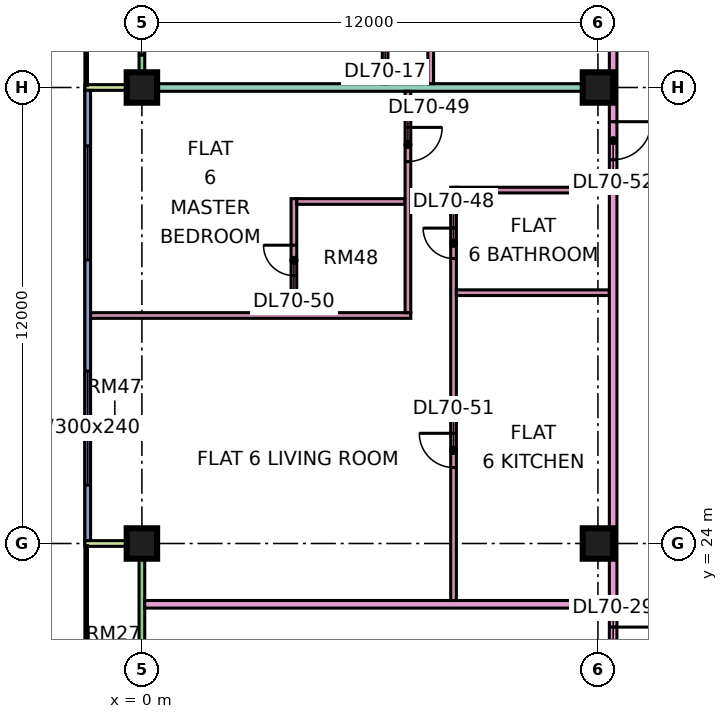
"""IFC4 building model, lengths in metres.
Left out: names, types, materials, properties, quantities, classifications, styles, units other than length and angle.
Written with IfcOpenShell. Run it as: python <this file> out.ifc"""

import sys

from ifc_helpers import new_model, si_unit, direction, frame, frame_2d, origin, origin_2d, place, context, subcontext, project, spatial, rectangle, extrude, element, fill, save


model = new_model("IFC4")
c1 = context("Model", 3, precision=1e-05, world=origin(), true_north=direction((0.0, 1.0)))
c2 = subcontext(c1, "Body", "Model", "MODEL_VIEW")
j1 = project(units=[si_unit("LENGTHUNIT", "METRE"), si_unit("PLANEANGLEUNIT", "RADIAN")], contexts=[c1])
p1 = place(None, origin())
s1 = spatial("IfcSite", under=j1, at=p1, CompositionType="ELEMENT")
p2 = place(p1, origin())
s2 = spatial("IfcBuilding", under=s1, at=p2, CompositionType="ELEMENT")
p3 = place(p2, frame((0.0, 0.0, 299.65)))
s3 = spatial("IfcBuildingStorey", under=s2, at=p3, CompositionType="ELEMENT", Elevation=299.65)
p4 = place(p3, frame((0.0, 24.0, 0.0), z_axis=(0.0, 0.0, 1.0), x_axis=(1.0, 0.0, 0.0)))
e1 = element("IfcColumn", 1, at=p4, inside=s3, PredefinedType="COLUMN", context=c2, shape_type="SweptSolid", body=[
    extrude(rectangle(XDim=0.8, YDim=0.8, at=origin_2d()), origin(), (0.0, 0.0, 1.0), 3.75),
])
p5 = place(p3, frame((0.0, 36.0, 0.0), z_axis=(0.0, 0.0, 1.0), x_axis=(1.0, 0.0, 0.0)))
e2 = element("IfcColumn", 2, at=p5, inside=s3, PredefinedType="COLUMN", context=c2, shape_type="SweptSolid", body=[
    extrude(rectangle(XDim=0.8, YDim=0.8, at=origin_2d()), origin(), (0.0, 0.0, 1.0), 3.75),
])
for number, where, z_axis, x_axis in (
    (3, (12.0, 24.0, 0.0), (0.0, 0.0, 1.0), (1.0, 0.0, 0.0)),
    (4, (12.0, 36.0, 0.0), (0.0, 0.0, 1.0), (1.0, 0.0, 0.0)),
):
    element("IfcColumn", number, at=place(p3, frame(where, z_axis=z_axis, x_axis=x_axis)), inside=s3, PredefinedType="COLUMN", context=c2, shape_type="SweptSolid", body=[
        extrude(rectangle(XDim=0.8, YDim=0.8, at=origin_2d()), origin(), (0.0, 0.0, 1.0), 3.75),
    ])
p6 = place(p3, frame((0.0, 47.925, 0.0), z_axis=(0.0, 0.0, 1.0), x_axis=(0.0, -1.0, 0.0)))
e5 = element("IfcWall", 5, at=p6, inside=s3, PredefinedType="SOLIDWALL", context=c2, shape_type="SweptSolid", body=[
    extrude(rectangle(XDim=11.85, YDim=0.15, at=frame_2d((5.925, 0.0))), origin(), (0.0, 0.0, 1.0), 3.35),
])
p7 = place(p6, frame((0.613, 0.0, 0.0)))
e6 = element("IfcOpeningElement", 6, at=p7, cuts=e5, PredefinedType="OPENING", context=c2, shape_type="SweptSolid", body=[
    extrude(rectangle(XDim=1.2, YDim=2.4, at=frame_2d((0.6, 1.2))), frame((0.0, 0.085, 0.0), z_axis=(0.0, -1.0, 0.0), x_axis=(1.0, 0.0, 0.0)), (0.0, 0.0, 1.0), 0.17),
])
p8 = place(p6, frame((3.775, 0.0, 0.45)))
e7 = element("IfcOpeningElement", 7, at=p8, cuts=e5, PredefinedType="OPENING", context=c2, shape_type="SweptSolid", body=[
    extrude(rectangle(XDim=1.8, YDim=2.4, at=frame_2d((0.9, 1.2))), frame((0.0, 0.085, 0.0), z_axis=(0.0, -1.0, 0.0), x_axis=(1.0, 0.0, 0.0)), (0.0, 0.0, 1.0), 0.17),
])
p9 = place(p6, frame((6.525, 0.0, 0.45)))
e8 = element("IfcOpeningElement", 8, at=p9, cuts=e5, PredefinedType="OPENING", context=c2, shape_type="SweptSolid", body=[
    extrude(rectangle(XDim=1.8, YDim=2.4, at=frame_2d((0.9, 1.2))), frame((0.0, 0.085, 0.0), z_axis=(0.0, -1.0, 0.0), x_axis=(1.0, 0.0, 0.0)), (0.0, 0.0, 1.0), 0.17),
])
p10 = place(p6, frame((9.275, 0.0, 0.45)))
e9 = element("IfcOpeningElement", 9, at=p10, cuts=e5, PredefinedType="OPENING", context=c2, shape_type="SweptSolid", body=[
    extrude(rectangle(XDim=1.8, YDim=2.4, at=frame_2d((0.9, 1.2))), frame((0.0, 0.085, 0.0), z_axis=(0.0, -1.0, 0.0), x_axis=(1.0, 0.0, 0.0)), (0.0, 0.0, 1.0), 0.17),
])
p11 = place(p3, frame((-1.5, 36.0, 0.0), z_axis=(0.0, 0.0, 1.0), x_axis=(1.0, 0.0, 0.0)))
e10 = element("IfcWall", 10, at=p11, inside=s3, PredefinedType="SOLIDWALL", context=c2, shape_type="SweptSolid", body=[
    extrude(rectangle(XDim=1.5, YDim=0.15, at=frame_2d((0.75, 0.0))), origin(), (0.0, 0.0, 1.0), 3.35),
])
p12 = place(p3, frame((-1.425, 35.925, 0.0), z_axis=(0.0, 0.0, 1.0), x_axis=(0.0, -1.0, 0.0)))
e11 = element("IfcWall", 11, at=p12, inside=s3, PredefinedType="SOLIDWALL", context=c2, shape_type="SweptSolid", body=[
    extrude(rectangle(XDim=11.85, YDim=0.15, at=frame_2d((5.925, 0.0))), origin(), (0.0, 0.0, 1.0), 3.35),
])
p13 = place(p12, frame((1.462, 0.0, 0.45)))
e12 = element("IfcOpeningElement", 12, at=p13, cuts=e11, PredefinedType="OPENING", context=c2, shape_type="SweptSolid", body=[
    extrude(rectangle(XDim=3.0, YDim=2.4, at=frame_2d((1.5, 1.2))), frame((0.0, 0.085, 0.0), z_axis=(0.0, -1.0, 0.0), x_axis=(1.0, 0.0, 0.0)), (0.0, 0.0, 1.0), 0.17),
])
p14 = place(p12, frame((7.387, 0.0, 0.45)))
e13 = element("IfcOpeningElement", 13, at=p14, cuts=e11, PredefinedType="OPENING", context=c2, shape_type="SweptSolid", body=[
    extrude(rectangle(XDim=3.0, YDim=2.4, at=frame_2d((1.5, 1.2))), frame((0.0, 0.085, 0.0), z_axis=(0.0, -1.0, 0.0), x_axis=(1.0, 0.0, 0.0)), (0.0, 0.0, 1.0), 0.17),
])
p15 = place(p3, frame((0.0, 23.925, 0.0), z_axis=(0.0, 0.0, 1.0), x_axis=(0.0, -1.0, 0.0)))
e14 = element("IfcWall", 14, at=p15, inside=s3, PredefinedType="SOLIDWALL", context=c2, shape_type="SweptSolid", body=[
    extrude(rectangle(XDim=11.35, YDim=0.15, at=frame_2d((5.675, 0.0))), origin(), (0.0, 0.0, 1.0), 3.35),
])
p16 = place(p15, frame((6.738, 0.0, 0.0)))
e15 = element("IfcOpeningElement", 15, at=p16, cuts=e14, PredefinedType="OPENING", context=c2, shape_type="SweptSolid", body=[
    extrude(rectangle(XDim=1.8, YDim=2.4, at=frame_2d((0.9, 1.2))), frame((0.0, 0.085, 0.0), z_axis=(0.0, -1.0, 0.0), x_axis=(1.0, 0.0, 0.0)), (0.0, 0.0, 1.0), 0.17),
])
p17 = place(p3, frame((-1.5, 24.0, 0.0), z_axis=(0.0, 0.0, 1.0), x_axis=(1.0, 0.0, 0.0)))
e16 = element("IfcWall", 16, at=p17, inside=s3, PredefinedType="SOLIDWALL", context=c2, shape_type="SweptSolid", body=[
    extrude(rectangle(XDim=1.5, YDim=0.15, at=frame_2d((0.75, 0.0))), origin(), (0.0, 0.0, 1.0), 3.35),
])
p18 = place(p3, frame((-1.35, 30.0, 0.0), z_axis=(0.0, 0.0, 1.0), x_axis=(1.0, 0.0, 0.0)))
e17 = element("IfcWall", 17, at=p18, inside=s3, PredefinedType="PARTITIONING", context=c2, shape_type="SweptSolid", body=[
    extrude(rectangle(XDim=8.425, YDim=0.15, at=frame_2d((4.212, 0.0))), origin(), (0.0, 0.0, 1.0), 3.35),
])
e18 = element("IfcWall", 18, at=p5, inside=s3, PredefinedType="PARTITIONING", context=c2, shape_type="SweptSolid", body=[
    extrude(rectangle(XDim=12.3, YDim=0.2, at=frame_2d((6.15, 0.0))), origin(), (0.0, 0.0, 1.0), 3.35),
])
p19 = place(p3, frame((0.074, 22.4, 0.0), z_axis=(0.0, 0.0, 1.0), x_axis=(1.0, 0.0, 0.0)))
e19 = element("IfcWall", 19, at=p19, inside=s3, PredefinedType="PARTITIONING", context=c2, shape_type="SweptSolid", body=[
    extrude(rectangle(XDim=12.226, YDim=0.2, at=frame_2d((6.113, 0.0))), origin(), (0.0, 0.0, 1.0), 3.35),
])
p20 = place(p3, frame((4.0, 30.075, 0.0), z_axis=(0.0, 0.0, 1.0), x_axis=(0.0, 1.0, 0.0)))
e20 = element("IfcWall", 20, at=p20, inside=s3, PredefinedType="PARTITIONING", context=c2, shape_type="SweptSolid", body=[
    extrude(rectangle(XDim=3.0, YDim=0.15, at=frame_2d((1.5, 0.0))), origin(), (0.0, 0.0, 1.0), 3.35),
])
p21 = place(p20, frame((0.975, 0.0, 0.0)))
e21 = element("IfcOpeningElement", 21, at=p21, cuts=e20, PredefinedType="OPENING", context=c2, shape_type="SweptSolid", body=[
    extrude(rectangle(XDim=0.8, YDim=2.1, at=frame_2d((0.4, 1.05))), frame((0.0, 0.085, 0.0), z_axis=(0.0, -1.0, 0.0), x_axis=(1.0, 0.0, 0.0)), (0.0, 0.0, 1.0), 0.17),
])
p22 = place(p3, frame((4.075, 33.0, 0.0), z_axis=(0.0, 0.0, 1.0), x_axis=(1.0, 0.0, 0.0)))
e22 = element("IfcWall", 22, at=p22, inside=s3, PredefinedType="PARTITIONING", context=c2, shape_type="SweptSolid", body=[
    extrude(rectangle(XDim=2.85, YDim=0.15, at=frame_2d((1.425, 0.0))), origin(), (0.0, 0.0, 1.0), 3.35),
])
p23 = place(p3, frame((6.4, 36.1, 0.0), z_axis=(0.0, 0.0, 1.0), x_axis=(0.0, 1.0, 0.0)))
e23 = element("IfcWall", 23, at=p23, inside=s3, PredefinedType="PARTITIONING", context=c2, shape_type="SweptSolid", body=[
    extrude(rectangle(XDim=8.95, YDim=0.15, at=frame_2d((4.475, 0.0))), origin(), (0.0, 0.0, 1.0), 3.35),
])
p24 = place(p23, frame((0.95, 0.0, 0.0)))
e24 = element("IfcOpeningElement", 24, at=p24, cuts=e23, PredefinedType="OPENING", context=c2, shape_type="SweptSolid", body=[
    extrude(rectangle(XDim=0.9, YDim=2.1, at=frame_2d((0.45, 1.05))), frame((0.0, 0.085, 0.0), z_axis=(0.0, -1.0, 0.0), x_axis=(1.0, 0.0, 0.0)), (0.0, 0.0, 1.0), 0.17),
])
p25 = place(p23, frame((6.95, 0.0, 0.0)))
e25 = element("IfcOpeningElement", 25, at=p25, cuts=e23, PredefinedType="OPENING", context=c2, shape_type="SweptSolid", body=[
    extrude(rectangle(XDim=0.9, YDim=2.1, at=frame_2d((0.45, 1.05))), frame((0.0, 0.085, 0.0), z_axis=(0.0, -1.0, 0.0), x_axis=(1.0, 0.0, 0.0)), (0.0, 0.0, 1.0), 0.17),
])
p26 = place(p23, frame((4.8, 0.0, 0.0)))
e26 = element("IfcOpeningElement", 26, at=p26, cuts=e23, PredefinedType="OPENING", context=c2, shape_type="SweptSolid", body=[
    extrude(rectangle(XDim=0.8, YDim=2.1, at=frame_2d((0.4, 1.05))), frame((0.0, 0.085, 0.0), z_axis=(0.0, -1.0, 0.0), x_axis=(1.0, 0.0, 0.0)), (0.0, 0.0, 1.0), 0.17),
])
p27 = place(p3, frame((7.0, 30.075, 0.0), z_axis=(0.0, 0.0, 1.0), x_axis=(0.0, 1.0, 0.0)))
e27 = element("IfcWall", 27, at=p27, inside=s3, PredefinedType="PARTITIONING", context=c2, shape_type="SweptSolid", body=[
    extrude(rectangle(XDim=5.825, YDim=0.15, at=frame_2d((2.913, 0.0))), origin(), (0.0, 0.0, 1.0), 3.35),
])
p28 = place(p27, frame((3.975, 0.0, 0.0)))
e28 = element("IfcOpeningElement", 28, at=p28, cuts=e27, PredefinedType="OPENING", context=c2, shape_type="SweptSolid", body=[
    extrude(rectangle(XDim=0.9, YDim=2.1, at=frame_2d((0.45, 1.05))), frame((0.0, 0.085, 0.0), z_axis=(0.0, -1.0, 0.0), x_axis=(1.0, 0.0, 0.0)), (0.0, 0.0, 1.0), 0.17),
])
p29 = place(p3, frame((7.6, 36.1, 0.0), z_axis=(0.0, 0.0, 1.0), x_axis=(0.0, 1.0, 0.0)))
e29 = element("IfcWall", 29, at=p29, inside=s3, PredefinedType="PARTITIONING", context=c2, shape_type="SweptSolid", body=[
    extrude(rectangle(XDim=15.275, YDim=0.15, at=frame_2d((7.637, 0.0))), origin(), (0.0, 0.0, 1.0), 3.35),
])
p30 = place(p29, frame((12.8, 0.0, 0.0)))
e30 = element("IfcOpeningElement", 30, at=p30, cuts=e29, PredefinedType="OPENING", context=c2, shape_type="SweptSolid", body=[
    extrude(rectangle(XDim=0.8, YDim=2.1, at=frame_2d((0.4, 1.05))), frame((0.0, 0.085, 0.0), z_axis=(0.0, -1.0, 0.0), x_axis=(1.0, 0.0, 0.0)), (0.0, 0.0, 1.0), 0.17),
])
p31 = place(p29, frame((2.6, 0.0, 0.0)))
e31 = element("IfcOpeningElement", 31, at=p31, cuts=e29, PredefinedType="OPENING", context=c2, shape_type="SweptSolid", body=[
    extrude(rectangle(XDim=0.9, YDim=2.1, at=frame_2d((0.45, 1.05))), frame((0.0, 0.085, 0.0), z_axis=(0.0, -1.0, 0.0), x_axis=(1.0, 0.0, 0.0)), (0.0, 0.0, 1.0), 0.17),
])
p32 = place(p29, frame((6.95, 0.0, 0.0)))
e32 = element("IfcOpeningElement", 32, at=p32, cuts=e29, PredefinedType="OPENING", context=c2, shape_type="SweptSolid", body=[
    extrude(rectangle(XDim=0.8, YDim=2.1, at=frame_2d((0.4, 1.05))), frame((0.0, 0.085, 0.0), z_axis=(0.0, -1.0, 0.0), x_axis=(1.0, 0.0, 0.0)), (0.0, 0.0, 1.0), 0.17),
])
p33 = place(p29, frame((9.5, 0.0, 0.0)))
e33 = element("IfcOpeningElement", 33, at=p33, cuts=e29, PredefinedType="OPENING", context=c2, shape_type="SweptSolid", body=[
    extrude(rectangle(XDim=0.8, YDim=2.1, at=frame_2d((0.4, 1.05))), frame((0.0, 0.085, 0.0), z_axis=(0.0, -1.0, 0.0), x_axis=(1.0, 0.0, 0.0)), (0.0, 0.0, 1.0), 0.17),
])
p34 = place(p3, frame((8.2, 22.5, 0.0), z_axis=(0.0, 0.0, 1.0), x_axis=(0.0, 1.0, 0.0)))
e34 = element("IfcWall", 34, at=p34, inside=s3, PredefinedType="PARTITIONING", context=c2, shape_type="SweptSolid", body=[
    extrude(rectangle(XDim=10.875, YDim=0.15, at=frame_2d((5.438, 0.0))), origin(), (0.0, 0.0, 1.0), 3.35),
])
p35 = place(p34, frame((9.0, 0.0, 0.0)))
e35 = element("IfcOpeningElement", 35, at=p35, cuts=e34, PredefinedType="OPENING", context=c2, shape_type="SweptSolid", body=[
    extrude(rectangle(XDim=0.8, YDim=2.1, at=frame_2d((0.4, 1.05))), frame((0.0, 0.085, 0.0), z_axis=(0.0, -1.0, 0.0), x_axis=(1.0, 0.0, 0.0)), (0.0, 0.0, 1.0), 0.17),
])
p36 = place(p34, frame((3.5, 0.0, 0.0)))
e36 = element("IfcOpeningElement", 36, at=p36, cuts=e34, PredefinedType="OPENING", context=c2, shape_type="SweptSolid", body=[
    extrude(rectangle(XDim=0.9, YDim=2.1, at=frame_2d((0.45, 1.05))), frame((0.0, 0.085, 0.0), z_axis=(0.0, -1.0, 0.0), x_axis=(1.0, 0.0, 0.0)), (0.0, 0.0, 1.0), 0.17),
])
for number, where, z_axis, x_axis in (
    (37, (8.275, 30.6, 0.0), (0.0, 0.0, 1.0), (1.0, 0.0, 0.0)),
    (38, (8.275, 33.3, 0.0), (0.0, 0.0, 1.0), (1.0, 0.0, 0.0)),
):
    element("IfcWall", number, at=place(p3, frame(where, z_axis=z_axis, x_axis=x_axis)), inside=s3, PredefinedType="PARTITIONING", context=c2, shape_type="SweptSolid", body=[
        extrude(rectangle(XDim=4.025, YDim=0.15, at=frame_2d((2.013, 0.0))), origin(), (0.0, 0.0, 1.0), 3.35),
    ])
p37 = place(p3, frame((12.4, 20.0, 0.0), z_axis=(0.0, 0.0, 1.0), x_axis=(0.0, 1.0, 0.0)))
e39 = element("IfcWall", 39, at=p37, inside=s3, PredefinedType="PARTITIONING", context=c2, shape_type="SweptSolid", body=[
    extrude(rectangle(XDim=33.926, YDim=0.2, at=frame_2d((16.963, 0.0))), origin(), (0.0, 0.0, 1.0), 3.35),
])
p38 = place(p37, frame((32.1, 0.0, 0.0)))
e40 = element("IfcOpeningElement", 40, at=p38, cuts=e39, PredefinedType="OPENING", context=c2, shape_type="SweptSolid", body=[
    extrude(rectangle(XDim=1.0, YDim=2.1, at=frame_2d((0.5, 1.05))), frame((0.0, 0.11, 0.0), z_axis=(0.0, -1.0, 0.0), x_axis=(1.0, 0.0, 0.0)), (0.0, 0.0, 1.0), 0.22),
])
p39 = place(p37, frame((0.6, 0.0, 0.0)))
e41 = element("IfcOpeningElement", 41, at=p39, cuts=e39, PredefinedType="OPENING", context=c2, shape_type="SweptSolid", body=[
    extrude(rectangle(XDim=1.2, YDim=2.1, at=frame_2d((0.6, 1.05))), frame((0.0, 0.11, 0.0), z_axis=(0.0, -1.0, 0.0), x_axis=(1.0, 0.0, 0.0)), (0.0, 0.0, 1.0), 0.22),
])
p40 = place(p37, frame((14.1, 0.0, 0.0)))
e42 = element("IfcOpeningElement", 42, at=p40, cuts=e39, PredefinedType="OPENING", context=c2, shape_type="SweptSolid", body=[
    extrude(rectangle(XDim=1.0, YDim=2.1, at=frame_2d((0.5, 1.05))), frame((0.0, 0.11, 0.0), z_axis=(0.0, -1.0, 0.0), x_axis=(1.0, 0.0, 0.0)), (0.0, 0.0, 1.0), 0.22),
])
p41 = place(p10, origin())
e43 = element("IfcWindow", 43, at=p41, inside=s3, PartitioningType="SINGLE_PANEL", PredefinedType="WINDOW", context=c2, shape_type="SweptSolid", body=[
    extrude(rectangle(XDim=1.8, YDim=2.4, at=frame_2d((0.9, 1.2))), frame((0.0, 0.03, 0.0), z_axis=(0.0, -1.0, 0.0), x_axis=(1.0, 0.0, 0.0)), (0.0, 0.0, 1.0), 0.06),
])
fill(e9, e43)
p42 = place(p13, origin())
e44 = element("IfcWindow", 44, at=p42, inside=s3, PartitioningType="SINGLE_PANEL", PredefinedType="WINDOW", context=c2, shape_type="SweptSolid", body=[
    extrude(rectangle(XDim=3.0, YDim=2.4, at=frame_2d((1.5, 1.2))), frame((0.0, 0.03, 0.0), z_axis=(0.0, -1.0, 0.0), x_axis=(1.0, 0.0, 0.0)), (0.0, 0.0, 1.0), 0.06),
])
fill(e12, e44)
p43 = place(p14, origin())
e45 = element("IfcWindow", 45, at=p43, inside=s3, PartitioningType="SINGLE_PANEL", PredefinedType="WINDOW", context=c2, shape_type="SweptSolid", body=[
    extrude(rectangle(XDim=3.0, YDim=2.4, at=frame_2d((1.5, 1.2))), frame((0.0, 0.03, 0.0), z_axis=(0.0, -1.0, 0.0), x_axis=(1.0, 0.0, 0.0)), (0.0, 0.0, 1.0), 0.06),
])
fill(e13, e45)
p44 = place(p39, origin())
e46 = element("IfcDoor", 46, at=p44, inside=s3, OperationType="SINGLE_SWING_RIGHT", PredefinedType="DOOR", context=c2, shape_type="SweptSolid", body=[
    extrude(rectangle(XDim=1.2, YDim=2.1, at=frame_2d((0.6, 1.05))), frame((0.0, 0.025, 0.0), z_axis=(0.0, -1.0, 0.0), x_axis=(1.0, 0.0, 0.0)), (0.0, 0.0, 1.0), 0.05),
])
fill(e41, e46)
p45 = place(p35, frame((0.8, 0.0, 0.0), z_axis=(0.0, 0.0, 1.0), x_axis=(-1.0, 0.0, 0.0)))
e47 = element("IfcDoor", 47, at=p45, inside=s3, OperationType="SINGLE_SWING_RIGHT", PredefinedType="DOOR", context=c2, shape_type="SweptSolid", body=[
    extrude(rectangle(XDim=0.8, YDim=2.1, at=frame_2d((0.4, 1.05))), frame((0.0, 0.025, 0.0), z_axis=(0.0, -1.0, 0.0), x_axis=(1.0, 0.0, 0.0)), (0.0, 0.0, 1.0), 0.05),
])
fill(e35, e47)
p46 = place(p28, origin())
e48 = element("IfcDoor", 48, at=p46, inside=s3, OperationType="SINGLE_SWING_RIGHT", PredefinedType="DOOR", context=c2, shape_type="SweptSolid", body=[
    extrude(rectangle(XDim=0.9, YDim=2.1, at=frame_2d((0.45, 1.05))), frame((0.0, 0.025, 0.0), z_axis=(0.0, -1.0, 0.0), x_axis=(1.0, 0.0, 0.0)), (0.0, 0.0, 1.0), 0.05),
])
fill(e28, e48)
p47 = place(p21, frame((0.8, 0.0, 0.0), z_axis=(0.0, 0.0, 1.0), x_axis=(-1.0, 0.0, 0.0)))
e49 = element("IfcDoor", 49, at=p47, inside=s3, OperationType="SINGLE_SWING_RIGHT", PredefinedType="DOOR", context=c2, shape_type="SweptSolid", body=[
    extrude(rectangle(XDim=0.8, YDim=2.1, at=frame_2d((0.4, 1.05))), frame((0.0, 0.025, 0.0), z_axis=(0.0, -1.0, 0.0), x_axis=(1.0, 0.0, 0.0)), (0.0, 0.0, 1.0), 0.05),
])
fill(e21, e49)
p48 = place(p36, frame((0.9, 0.0, 0.0), z_axis=(0.0, 0.0, 1.0), x_axis=(-1.0, 0.0, 0.0)))
e50 = element("IfcDoor", 50, at=p48, inside=s3, OperationType="SINGLE_SWING_RIGHT", PredefinedType="DOOR", context=c2, shape_type="SweptSolid", body=[
    extrude(rectangle(XDim=0.9, YDim=2.1, at=frame_2d((0.45, 1.05))), frame((0.0, 0.025, 0.0), z_axis=(0.0, -1.0, 0.0), x_axis=(1.0, 0.0, 0.0)), (0.0, 0.0, 1.0), 0.05),
])
fill(e36, e50)
p49 = place(p40, origin())
e51 = element("IfcDoor", 51, at=p49, inside=s3, OperationType="SINGLE_SWING_RIGHT", PredefinedType="DOOR", context=c2, shape_type="SweptSolid", body=[
    extrude(rectangle(XDim=1.0, YDim=2.1, at=frame_2d((0.5, 1.05))), frame((0.0, 0.025, 0.0), z_axis=(0.0, -1.0, 0.0), x_axis=(1.0, 0.0, 0.0)), (0.0, 0.0, 1.0), 0.05),
])
fill(e42, e51)
save(model, sys.argv[1])
